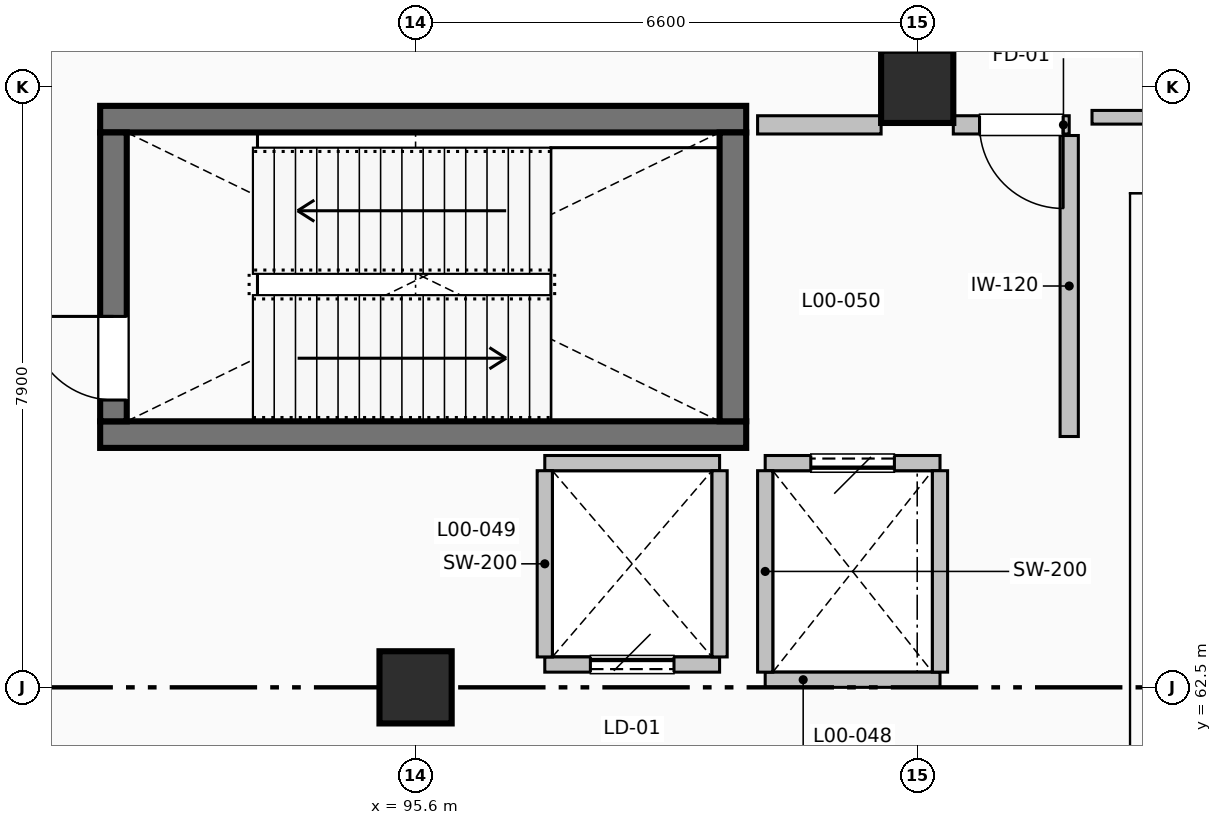
"""IFC4 building model, lengths in metres.
Left out: names, types, materials, properties, quantities, classifications, styles, units other than length and angle.
Written with IfcOpenShell. Run it as: python <this file> out.ifc"""

import sys

from ifc_helpers import new_model, si_unit, direction, frame, frame_2d, origin, origin_2d, place, context, subcontext, project, spatial, rectangle, extrude, element, fill, save


model = new_model("IFC4")
c1 = context("Model", 3, precision=1e-05, world=origin(), true_north=direction((0.0, 1.0)))
c2 = subcontext(c1, "Body", "Model", "MODEL_VIEW")
j1 = project(units=[si_unit("LENGTHUNIT", "METRE"), si_unit("PLANEANGLEUNIT", "RADIAN")], contexts=[c1])
p1 = place(None, origin())
s1 = spatial("IfcSite", under=j1, at=p1, CompositionType="ELEMENT")
p2 = place(p1, origin())
s2 = spatial("IfcBuilding", under=s1, at=p2, CompositionType="ELEMENT")
p3 = place(p2, origin())
s3 = spatial("IfcBuildingStorey", under=s2, at=p3, CompositionType="ELEMENT", Elevation=0.0)
for number, where, z_axis, x_axis in (
    (1, (95.6, 62.5, 0.0), (0.0, 0.0, 1.0), (1.0, 0.0, 0.0)),
    (2, (102.2, 70.4, 0.0), (0.0, 0.0, 1.0), (1.0, 0.0, 0.0)),
):
    element("IfcColumn", number, at=place(p3, frame(where, z_axis=z_axis, x_axis=x_axis)), inside=s3, PredefinedType="COLUMN", context=c2, shape_type="SweptSolid", body=[
        extrude(rectangle(XDim=0.95, YDim=0.95, at=origin_2d()), origin(), (0.0, 0.0, 1.0), 5.4),
    ])
for number, where, z_axis, x_axis in (
    (3, (91.45, 65.825, 0.0), (0.0, 0.0, 1.0), (1.0, 0.0, 0.0)),
    (4, (99.95, 69.975, 0.0), (0.0, 0.0, 1.0), (-1.0, 0.0, 0.0)),
):
    element("IfcWall", number, at=place(p3, frame(where, z_axis=z_axis, x_axis=x_axis)), inside=s3, PredefinedType="SHEAR", context=c2, shape_type="SweptSolid", body=[
        extrude(rectangle(XDim=8.5, YDim=0.35, at=frame_2d((4.25, 0.0))), origin(), (0.0, 0.0, 1.0), 5.1),
    ])
p4 = place(p3, frame((91.625, 66.0, 0.0), z_axis=(0.0, 0.0, 1.0), x_axis=(0.0, 1.0, 0.0)))
e5 = element("IfcWall", 5, at=p4, inside=s3, PredefinedType="SHEAR", context=c2, shape_type="SweptSolid", body=[
    extrude(rectangle(XDim=3.8, YDim=0.35, at=frame_2d((1.9, 0.0))), origin(), (0.0, 0.0, 1.0), 5.1),
])
p5 = place(p4, frame((0.28, 0.0, 0.0)))
e6 = element("IfcOpeningElement", 6, at=p5, cuts=e5, PredefinedType="OPENING", context=c2, shape_type="SweptSolid", body=[
    extrude(rectangle(XDim=1.1, YDim=2.08, at=frame_2d((0.55, 1.04))), frame((0.0, 0.185, 0.0), z_axis=(0.0, -1.0, 0.0), x_axis=(1.0, 0.0, 0.0)), (0.0, 0.0, 1.0), 0.37),
])
p6 = place(p3, frame((99.775, 69.8, 0.0), z_axis=(0.0, 0.0, 1.0), x_axis=(0.0, -1.0, 0.0)))
e7 = element("IfcWall", 7, at=p6, inside=s3, PredefinedType="SHEAR", context=c2, shape_type="SweptSolid", body=[
    extrude(rectangle(XDim=3.8, YDim=0.35, at=frame_2d((1.9, 0.0))), origin(), (0.0, 0.0, 1.0), 5.1),
])
p7 = place(p3, frame((100.2, 62.6, 0.0), z_axis=(0.0, 0.0, 1.0), x_axis=(1.0, 0.0, 0.0)))
e8 = element("IfcWall", 8, at=p7, inside=s3, PredefinedType="PARTITIONING", context=c2, shape_type="SweptSolid", body=[
    extrude(rectangle(XDim=2.3, YDim=0.2, at=frame_2d((1.15, 0.0))), origin(), (0.0, 0.0, 1.0), 5.092),
])
p8 = place(p3, frame((102.5, 65.45, 0.0), z_axis=(0.0, 0.0, 1.0), x_axis=(-1.0, 0.0, 0.0)))
e9 = element("IfcWall", 9, at=p8, inside=s3, PredefinedType="PARTITIONING", context=c2, shape_type="SweptSolid", body=[
    extrude(rectangle(XDim=2.3, YDim=0.2, at=frame_2d((1.15, 0.0))), origin(), (0.0, 0.0, 1.0), 5.092),
])
p9 = place(p8, frame((0.6, 0.0, 0.0)))
e10 = element("IfcOpeningElement", 10, at=p9, cuts=e9, PredefinedType="OPENING", context=c2, shape_type="SweptSolid", body=[
    extrude(rectangle(XDim=1.1, YDim=2.15, at=frame_2d((0.55, 1.075))), frame((0.0, 0.11, 0.0), z_axis=(0.0, -1.0, 0.0), x_axis=(1.0, 0.0, 0.0)), (0.0, 0.0, 1.0), 0.22),
])
for number, where, z_axis, x_axis in (
    (11, (100.2, 62.7, 0.0), (0.0, 0.0, 1.0), (0.0, 1.0, 0.0)),
    (12, (102.5, 65.35, 0.0), (0.0, 0.0, 1.0), (0.0, -1.0, 0.0)),
):
    element("IfcWall", number, at=place(p3, frame(where, z_axis=z_axis, x_axis=x_axis)), inside=s3, PredefinedType="PARTITIONING", context=c2, shape_type="SweptSolid", body=[
        extrude(rectangle(XDim=2.65, YDim=0.2, at=frame_2d((1.325, 0.0))), origin(), (0.0, 0.0, 1.0), 5.092),
    ])
p10 = place(p3, frame((97.3, 62.8, 0.0), z_axis=(0.0, 0.0, 1.0), x_axis=(1.0, 0.0, 0.0)))
e13 = element("IfcWall", 13, at=p10, inside=s3, PredefinedType="PARTITIONING", context=c2, shape_type="SweptSolid", body=[
    extrude(rectangle(XDim=2.3, YDim=0.2, at=frame_2d((1.15, 0.0))), origin(), (0.0, 0.0, 1.0), 5.092),
])
p11 = place(p10, frame((0.6, 0.0, 0.0)))
e14 = element("IfcOpeningElement", 14, at=p11, cuts=e13, PredefinedType="OPENING", context=c2, shape_type="SweptSolid", body=[
    extrude(rectangle(XDim=1.1, YDim=2.15, at=frame_2d((0.55, 1.075))), frame((0.0, 0.11, 0.0), z_axis=(0.0, -1.0, 0.0), x_axis=(1.0, 0.0, 0.0)), (0.0, 0.0, 1.0), 0.22),
])
p12 = place(p3, frame((99.6, 65.45, 0.0), z_axis=(0.0, 0.0, 1.0), x_axis=(-1.0, 0.0, 0.0)))
e15 = element("IfcWall", 15, at=p12, inside=s3, PredefinedType="PARTITIONING", context=c2, shape_type="SweptSolid", body=[
    extrude(rectangle(XDim=2.3, YDim=0.2, at=frame_2d((1.15, 0.0))), origin(), (0.0, 0.0, 1.0), 5.092),
])
for number, where, z_axis, x_axis in (
    (16, (97.3, 62.9, 0.0), (0.0, 0.0, 1.0), (0.0, 1.0, 0.0)),
    (17, (99.6, 65.35, 0.0), (0.0, 0.0, 1.0), (0.0, -1.0, 0.0)),
):
    element("IfcWall", number, at=place(p3, frame(where, z_axis=z_axis, x_axis=x_axis)), inside=s3, PredefinedType="PARTITIONING", context=c2, shape_type="SweptSolid", body=[
        extrude(rectangle(XDim=2.45, YDim=0.2, at=frame_2d((1.225, 0.0))), origin(), (0.0, 0.0, 1.0), 5.092),
    ])
p13 = place(p3, frame((104.2, 69.9, 0.0), z_axis=(0.0, 0.0, 1.0), x_axis=(-1.0, 0.0, 0.0)))
e18 = element("IfcWall", 18, at=p13, inside=s3, PredefinedType="PARTITIONING", context=c2, shape_type="SweptSolid", body=[
    extrude(rectangle(XDim=1.525, YDim=0.24, at=frame_2d((0.762, 0.0))), origin(), (0.0, 0.0, 1.0), 5.092),
])
p14 = place(p13, frame((0.08, 0.0, 0.0)))
e19 = element("IfcOpeningElement", 19, at=p14, cuts=e18, PredefinedType="OPENING", context=c2, shape_type="SweptSolid", body=[
    extrude(rectangle(XDim=1.1, YDim=2.08, at=frame_2d((0.55, 1.04))), frame((0.0, 0.13, 0.0), z_axis=(0.0, -1.0, 0.0), x_axis=(1.0, 0.0, 0.0)), (0.0, 0.0, 1.0), 0.26),
])
p15 = place(p3, frame((101.725, 69.9, 0.0), z_axis=(0.0, 0.0, 1.0), x_axis=(-1.0, 0.0, 0.0)))
e20 = element("IfcWall", 20, at=p15, inside=s3, PredefinedType="PARTITIONING", context=c2, shape_type="SweptSolid", body=[
    extrude(rectangle(XDim=1.625, YDim=0.24, at=frame_2d((0.812, 0.0))), origin(), (0.0, 0.0, 1.0), 5.092),
])
p16 = place(p3, frame((104.2, 69.76, 0.0), z_axis=(0.0, 0.0, 1.0), x_axis=(0.0, -1.0, 0.0)))
e21 = element("IfcWall", 21, at=p16, inside=s3, PredefinedType="PARTITIONING", context=c2, shape_type="SweptSolid", body=[
    extrude(rectangle(XDim=3.96, YDim=0.24, at=frame_2d((1.98, 0.0))), origin(), (0.0, 0.0, 1.0), 5.092),
])
p17 = place(p3, frame((104.5, 70.0, 0.0), z_axis=(0.0, 0.0, 1.0), x_axis=(1.0, 0.0, 0.0)))
e22 = element("IfcWall", 22, at=p17, inside=s3, PredefinedType="PARTITIONING", context=c2, shape_type="SweptSolid", body=[
    extrude(rectangle(XDim=12.233, YDim=0.18, at=frame_2d((6.116, 0.0))), origin(), (0.0, 0.0, 1.0), 3.492),
])
p18 = place(p17, frame((5.067, 0.0, 0.0)))
e23 = element("IfcOpeningElement", 23, at=p18, cuts=e22, PredefinedType="OPENING", context=c2, shape_type="SweptSolid", body=[
    extrude(rectangle(XDim=2.1, YDim=2.25, at=frame_2d((1.05, 1.125))), frame((0.0, 0.1, 0.0), z_axis=(0.0, -1.0, 0.0), x_axis=(1.0, 0.0, 0.0)), (0.0, 0.0, 1.0), 0.2),
])
p19 = place(p5, origin())
e24 = element("IfcDoor", 24, at=p19, inside=s3, OperationType="SINGLE_SWING_RIGHT", PredefinedType="DOOR", context=c2, shape_type="SweptSolid", body=[
    extrude(rectangle(XDim=1.1, YDim=2.08, at=frame_2d((0.55, 1.04))), frame((0.0, 0.025, 0.0), z_axis=(0.0, -1.0, 0.0), x_axis=(1.0, 0.0, 0.0)), (0.0, 0.0, 1.0), 0.05),
])
fill(e6, e24)
p20 = place(p9, origin())
e25 = element("IfcDoor", 25, at=p20, inside=s3, OperationType="SLIDING_TO_LEFT", PredefinedType="DOOR", context=c2, shape_type="SweptSolid", body=[
    extrude(rectangle(XDim=1.1, YDim=2.15, at=frame_2d((0.55, 1.075))), frame((0.0, 0.025, 0.0), z_axis=(0.0, -1.0, 0.0), x_axis=(1.0, 0.0, 0.0)), (0.0, 0.0, 1.0), 0.05),
])
fill(e10, e25)
p21 = place(p11, origin())
e26 = element("IfcDoor", 26, at=p21, inside=s3, OperationType="SLIDING_TO_LEFT", PredefinedType="DOOR", context=c2, shape_type="SweptSolid", body=[
    extrude(rectangle(XDim=1.1, YDim=2.15, at=frame_2d((0.55, 1.075))), frame((0.0, 0.025, 0.0), z_axis=(0.0, -1.0, 0.0), x_axis=(1.0, 0.0, 0.0)), (0.0, 0.0, 1.0), 0.05),
])
fill(e14, e26)
p22 = place(p14, origin())
e27 = element("IfcDoor", 27, at=p22, inside=s3, OperationType="SINGLE_SWING_LEFT", PredefinedType="DOOR", context=c2, shape_type="SweptSolid", body=[
    extrude(rectangle(XDim=1.1, YDim=2.08, at=frame_2d((0.55, 1.04))), frame((0.0, 0.025, 0.0), z_axis=(0.0, -1.0, 0.0), x_axis=(1.0, 0.0, 0.0)), (0.0, 0.0, 1.0), 0.05),
])
fill(e19, e27)
save(model, sys.argv[1])
